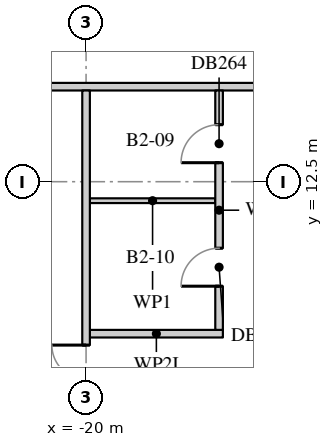
"""IFC4 building model, lengths in metres.
Left out: names, types, materials, properties, quantities, classifications, styles, units other than length and angle.
Written with IfcOpenShell. Run it as: python <this file> out.ifc"""

import sys

from ifc_helpers import new_model, si_unit, direction, frame, frame_2d, origin, place, context, subcontext, project, spatial, rectangle, extrude, element, fill, save


model = new_model("IFC4")
c1 = context("Model", 3, precision=1e-05, world=origin(), true_north=direction((0.0, 1.0)))
c2 = subcontext(c1, "Body", "Model", "MODEL_VIEW")
j1 = project(units=[si_unit("LENGTHUNIT", "METRE"), si_unit("PLANEANGLEUNIT", "RADIAN")], contexts=[c1])
p1 = place(None, origin())
s1 = spatial("IfcSite", under=j1, at=p1, CompositionType="ELEMENT")
p2 = place(p1, origin())
s2 = spatial("IfcBuilding", under=s1, at=p2, CompositionType="ELEMENT")
p3 = place(p2, frame((0.0, 0.0, -10.4)))
s3 = spatial("IfcBuildingStorey", under=s2, at=p3, CompositionType="ELEMENT", Elevation=-10.4)
p4 = place(p3, frame((-19.9, 8.5, 0.0), z_axis=(0.0, 0.0, 1.0), x_axis=(1.0, 0.0, 0.0)))
e1 = element("IfcWall", 1, at=p4, inside=s3, PredefinedType="PARTITIONING", context=c2, shape_type="SweptSolid", body=[
    extrude(rectangle(XDim=3.5, YDim=0.2, at=frame_2d((1.75, 0.0))), origin(), (0.0, 0.0, 1.0), 4.2),
])
p5 = place(p3, frame((-19.9, 12.0, 0.0), z_axis=(0.0, 0.0, 1.0), x_axis=(1.0, 0.0, 0.0)))
e2 = element("IfcWall", 2, at=p5, inside=s3, PredefinedType="PARTITIONING", context=c2, shape_type="SweptSolid", body=[
    extrude(rectangle(XDim=3.3, YDim=0.125, at=frame_2d((1.65, 0.0))), origin(), (0.0, 0.0, 1.0), 4.2),
])
p6 = place(p3, frame((-27.65, 15.0, 0.0), z_axis=(0.0, 0.0, 1.0), x_axis=(1.0, 0.0, 0.0)))
e3 = element("IfcWall", 3, at=p6, inside=s3, PredefinedType="PARTITIONING", context=c2, shape_type="SweptSolid", body=[
    extrude(rectangle(XDim=31.75, YDim=0.2, at=frame_2d((15.875, 0.0))), origin(), (0.0, 0.0, 1.0), 4.15),
])
p7 = place(p6, frame((2.75, 0.0, 0.0)))
e4 = element("IfcOpeningElement", 4, at=p7, cuts=e3, PredefinedType="OPENING", context=c2, shape_type="SweptSolid", body=[
    extrude(rectangle(XDim=1.8, YDim=2.1, at=frame_2d((0.9, 1.05))), frame((0.0, 0.11, 0.0), z_axis=(0.0, -1.0, 0.0), x_axis=(1.0, 0.0, 0.0)), (0.0, 0.0, 1.0), 0.22),
])
p8 = place(p6, frame((18.75, 0.0, 0.0)))
e5 = element("IfcOpeningElement", 5, at=p8, cuts=e3, PredefinedType="OPENING", context=c2, shape_type="SweptSolid", body=[
    extrude(rectangle(XDim=1.8, YDim=2.1, at=frame_2d((0.9, 1.05))), frame((0.0, 0.11, 0.0), z_axis=(0.0, -1.0, 0.0), x_axis=(1.0, 0.0, 0.0)), (0.0, 0.0, 1.0), 0.22),
])
p9 = place(p3, frame((-20.0, -14.9, 0.0), z_axis=(0.0, 0.0, 1.0), x_axis=(0.0, 1.0, 0.0)))
e6 = element("IfcWall", 6, at=p9, inside=s3, PredefinedType="PARTITIONING", context=c2, shape_type="SweptSolid", body=[
    extrude(rectangle(XDim=29.8, YDim=0.2, at=frame_2d((14.9, 0.0))), origin(), (0.0, 0.0, 1.0), 4.75),
])
p10 = place(p9, frame((1.5, 0.0, 0.0)))
e7 = element("IfcOpeningElement", 7, at=p10, cuts=e6, PredefinedType="OPENING", context=c2, shape_type="SweptSolid", body=[
    extrude(rectangle(XDim=1.8, YDim=2.1, at=frame_2d((0.9, 1.05))), frame((0.0, 0.11, 0.0), z_axis=(0.0, -1.0, 0.0), x_axis=(1.0, 0.0, 0.0)), (0.0, 0.0, 1.0), 0.22),
])
p11 = place(p9, frame((9.0, 0.0, 0.0)))
e8 = element("IfcOpeningElement", 8, at=p11, cuts=e6, PredefinedType="OPENING", context=c2, shape_type="SweptSolid", body=[
    extrude(rectangle(XDim=1.8, YDim=2.1, at=frame_2d((0.9, 1.05))), frame((0.0, 0.11, 0.0), z_axis=(0.0, -1.0, 0.0), x_axis=(1.0, 0.0, 0.0)), (0.0, 0.0, 1.0), 0.22),
])
p12 = place(p9, frame((13.0, 0.0, 0.0)))
e9 = element("IfcOpeningElement", 9, at=p12, cuts=e6, PredefinedType="OPENING", context=c2, shape_type="SweptSolid", body=[
    extrude(rectangle(XDim=1.8, YDim=2.1, at=frame_2d((0.9, 1.05))), frame((0.0, 0.11, 0.0), z_axis=(0.0, -1.0, 0.0), x_axis=(1.0, 0.0, 0.0)), (0.0, 0.0, 1.0), 0.22),
])
p13 = place(p9, frame((21.3, 0.0, 0.0)))
e10 = element("IfcOpeningElement", 10, at=p13, cuts=e6, PredefinedType="OPENING", context=c2, shape_type="SweptSolid", body=[
    extrude(rectangle(XDim=1.8, YDim=2.1, at=frame_2d((0.9, 1.05))), frame((0.0, 0.11, 0.0), z_axis=(0.0, -1.0, 0.0), x_axis=(1.0, 0.0, 0.0)), (0.0, 0.0, 1.0), 0.22),
])
p14 = place(p3, frame((-16.5, 8.6, 0.0), z_axis=(0.0, 0.0, 1.0), x_axis=(0.0, 1.0, 0.0)))
e11 = element("IfcWall", 11, at=p14, inside=s3, PredefinedType="PARTITIONING", context=c2, shape_type="SweptSolid", body=[
    extrude(rectangle(XDim=6.3, YDim=0.2, at=frame_2d((3.15, 0.0))), origin(), (0.0, 0.0, 1.0), 4.75),
])
p15 = place(p14, frame((4.4, 0.0, 0.0)))
e12 = element("IfcOpeningElement", 12, at=p15, cuts=e11, PredefinedType="OPENING", context=c2, shape_type="SweptSolid", body=[
    extrude(rectangle(XDim=1.0, YDim=2.1, at=frame_2d((0.5, 1.05))), frame((0.0, 0.11, 0.0), z_axis=(0.0, -1.0, 0.0), x_axis=(1.0, 0.0, 0.0)), (0.0, 0.0, 1.0), 0.22),
])
p16 = place(p14, frame((1.15, 0.0, 0.0)))
e13 = element("IfcOpeningElement", 13, at=p16, cuts=e11, PredefinedType="OPENING", context=c2, shape_type="SweptSolid", body=[
    extrude(rectangle(XDim=1.0, YDim=2.1, at=frame_2d((0.5, 1.05))), frame((0.0, 0.11, 0.0), z_axis=(0.0, -1.0, 0.0), x_axis=(1.0, 0.0, 0.0)), (0.0, 0.0, 1.0), 0.22),
])
p17 = place(p13, origin())
e14 = element("IfcDoor", 14, at=p17, inside=s3, OperationType="DOUBLE_DOOR_SINGLE_SWING", PredefinedType="DOOR", context=c2, shape_type="SweptSolid", body=[
    extrude(rectangle(XDim=1.8, YDim=2.1, at=frame_2d((0.9, 1.05))), frame((0.0, 0.025, 0.0), z_axis=(0.0, -1.0, 0.0), x_axis=(1.0, 0.0, 0.0)), (0.0, 0.0, 1.0), 0.05),
])
fill(e10, e14)
p18 = place(p15, origin())
e15 = element("IfcDoor", 15, at=p18, inside=s3, OperationType="SINGLE_SWING_LEFT", PredefinedType="DOOR", context=c2, shape_type="SweptSolid", body=[
    extrude(rectangle(XDim=1.0, YDim=2.1, at=frame_2d((0.5, 1.05))), frame((0.0, 0.025, 0.0), z_axis=(0.0, -1.0, 0.0), x_axis=(1.0, 0.0, 0.0)), (0.0, 0.0, 1.0), 0.05),
])
fill(e12, e15)
p19 = place(p16, origin())
e16 = element("IfcDoor", 16, at=p19, inside=s3, OperationType="SINGLE_SWING_LEFT", PredefinedType="DOOR", context=c2, shape_type="SweptSolid", body=[
    extrude(rectangle(XDim=1.0, YDim=2.1, at=frame_2d((0.5, 1.05))), frame((0.0, 0.025, 0.0), z_axis=(0.0, -1.0, 0.0), x_axis=(1.0, 0.0, 0.0)), (0.0, 0.0, 1.0), 0.05),
])
fill(e13, e16)
save(model, sys.argv[1])
